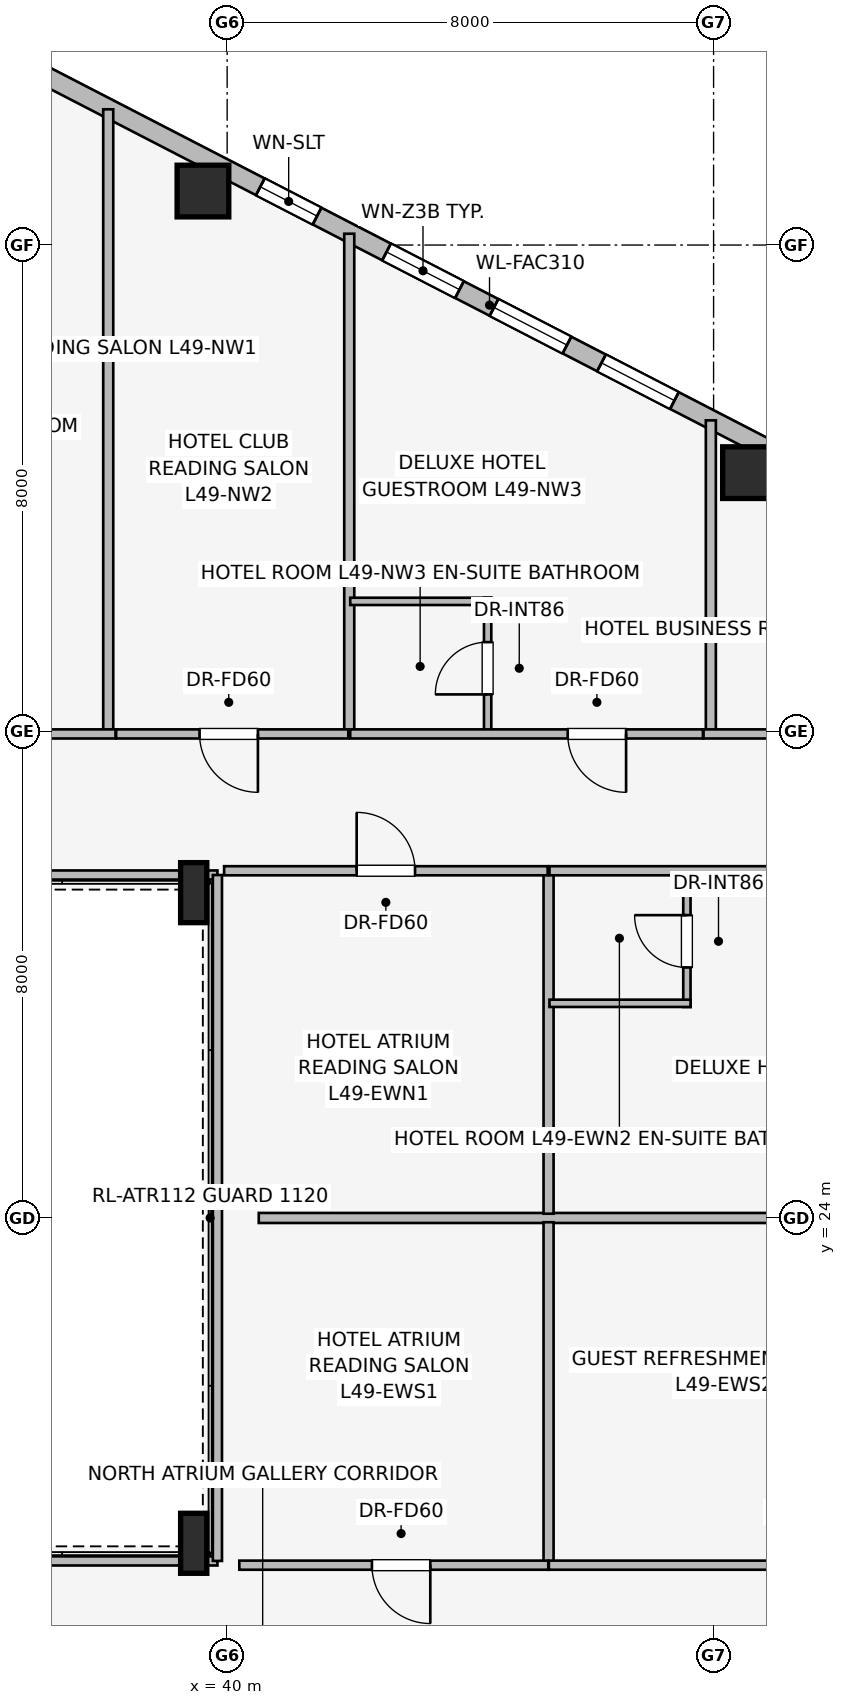
"""IFC4 building model, lengths in metres.
Left out: names, types, materials, properties, quantities, classifications, styles, units other than length and angle.
Written with IfcOpenShell. Run it as: python <this file> out.ifc"""

import sys

from ifc_helpers import new_model, si_unit, direction, frame, frame_2d, origin, origin_2d, place, context, subcontext, project, spatial, rectangle, i_section, extrude, element, fill, save


model = new_model("IFC4")
c1 = context("Model", 3, precision=1e-05, world=origin(), true_north=direction((0.0, 1.0)))
c2 = subcontext(c1, "Body", "Model", "MODEL_VIEW")
j1 = project(units=[si_unit("LENGTHUNIT", "METRE"), si_unit("PLANEANGLEUNIT", "RADIAN")], contexts=[c1])
p1 = place(None, origin())
s1 = spatial("IfcSite", under=j1, at=p1, CompositionType="ELEMENT")
p2 = place(p1, origin())
s2 = spatial("IfcBuilding", under=s1, at=p2, CompositionType="ELEMENT")
p3 = place(p2, frame((0.0, 0.0, 180.9)))
s3 = spatial("IfcBuildingStorey", under=s2, at=p3, CompositionType="ELEMENT", Elevation=180.9)
for number, where, z_axis, x_axis in (
    (1, (48.574, 36.257, 0.0), (0.0, 0.0, 1.0), (1.0, 0.0, 0.0)),
    (2, (39.602, 40.888, 0.0), (0.0, 0.0, 1.0), (1.0, 0.0, 0.0)),
):
    element("IfcColumn", number, at=place(p3, frame(where, z_axis=z_axis, x_axis=x_axis)), inside=s3, PredefinedType="COLUMN", context=c2, shape_type="SweptSolid", body=[
        extrude(rectangle(XDim=0.85, YDim=0.85, at=origin_2d()), origin(), (0.0, 0.0, 1.0), 3.45),
    ])
for number, where, z_axis, x_axis in (
    (3, (39.45, 18.65, 0.0), (0.0, 0.0, 1.0), (1.0, 0.0, 0.0)),
    (4, (39.45, 29.35, 0.0), (0.0, 0.0, 1.0), (1.0, 0.0, 0.0)),
):
    element("IfcColumn", number, at=place(p3, frame(where, z_axis=z_axis, x_axis=x_axis)), inside=s3, PredefinedType="COLUMN", context=c2, shape_type="SweptSolid", body=[
        extrude(i_section(OverallWidth=0.431, OverallDepth=0.987, WebThickness=0.034, FlangeThickness=0.062, at=origin_2d()), origin(), (0.0, 0.0, 1.0), 3.45),
    ])
p4 = place(p3, frame((36.838, 42.871, 0.0), z_axis=(0.0, 0.0, 1.0), x_axis=(0.888626188278, -0.458632202867, 0.0)))
e5 = element("IfcWall", 5, at=p4, inside=s3, PredefinedType="STANDARD", context=c2, shape_type="SweptSolid", body=[
    extrude(rectangle(XDim=16.828, YDim=0.31, at=frame_2d((8.414, 0.0))), origin(), (0.0, 0.0, 1.0), 3.19),
])
p5 = place(p4, frame((4.172, 0.0, 0.75)))
e6 = element("IfcOpeningElement", 6, at=p5, cuts=e5, PredefinedType="OPENING", context=c2, shape_type="SweptSolid", body=[
    extrude(rectangle(XDim=1.05, YDim=1.4, at=frame_2d((0.525, 0.7))), frame((0.0, 0.165, 0.0), z_axis=(0.0, -1.0, 0.0), x_axis=(1.0, 0.0, 0.0)), (0.0, 0.0, 1.0), 0.33),
])
p6 = place(p4, frame((6.508, 0.0, 0.75)))
e7 = element("IfcOpeningElement", 7, at=p6, cuts=e5, PredefinedType="OPENING", context=c2, shape_type="SweptSolid", body=[
    extrude(rectangle(XDim=1.35, YDim=1.45, at=frame_2d((0.675, 0.725))), frame((0.0, 0.165, 0.0), z_axis=(0.0, -1.0, 0.0), x_axis=(1.0, 0.0, 0.0)), (0.0, 0.0, 1.0), 0.33),
])
p7 = place(p4, frame((8.497, 0.0, 0.75)))
e8 = element("IfcOpeningElement", 8, at=p7, cuts=e5, PredefinedType="OPENING", context=c2, shape_type="SweptSolid", body=[
    extrude(rectangle(XDim=1.35, YDim=1.45, at=frame_2d((0.675, 0.725))), frame((0.0, 0.165, 0.0), z_axis=(0.0, -1.0, 0.0), x_axis=(1.0, 0.0, 0.0)), (0.0, 0.0, 1.0), 0.33),
])
p8 = place(p4, frame((10.486, 0.0, 0.75)))
e9 = element("IfcOpeningElement", 9, at=p8, cuts=e5, PredefinedType="OPENING", context=c2, shape_type="SweptSolid", body=[
    extrude(rectangle(XDim=1.35, YDim=1.45, at=frame_2d((0.675, 0.725))), frame((0.0, 0.165, 0.0), z_axis=(0.0, -1.0, 0.0), x_axis=(1.0, 0.0, 0.0)), (0.0, 0.0, 1.0), 0.33),
])
p9 = place(p4, frame((14.153, 0.0, 0.75)))
e10 = element("IfcOpeningElement", 10, at=p9, cuts=e5, PredefinedType="OPENING", context=c2, shape_type="SweptSolid", body=[
    extrude(rectangle(XDim=2.0, YDim=1.5, at=frame_2d((1.0, 0.75))), frame((0.0, 0.165, 0.0), z_axis=(0.0, -1.0, 0.0), x_axis=(1.0, 0.0, 0.0)), (0.0, 0.0, 1.0), 0.33),
])
p10 = place(p3, frame((27.675, 18.36, 0.0), z_axis=(0.0, 0.0, 1.0), x_axis=(1.0, 0.0, 0.0)))
e11 = element("IfcWall", 11, at=p10, inside=s3, PredefinedType="PARTITIONING", context=c2, shape_type="SweptSolid", body=[
    extrude(rectangle(XDim=12.165, YDim=0.15, at=frame_2d((6.083, 0.0))), origin(), (0.0, 0.0, 1.0), 2.331),
])
p11 = place(p3, frame((39.84, 29.64, 0.0), z_axis=(0.0, 0.0, 1.0), x_axis=(-1.0, 0.0, 0.0)))
e12 = element("IfcWall", 12, at=p11, inside=s3, PredefinedType="PARTITIONING", context=c2, shape_type="SweptSolid", body=[
    extrude(rectangle(XDim=12.2, YDim=0.15, at=frame_2d((6.1, 0.0))), origin(), (0.0, 0.0, 1.0), 2.331),
])
p12 = place(p3, frame((39.84, 18.36, 0.0), z_axis=(0.0, 0.0, 1.0), x_axis=(0.0, 1.0, 0.0)))
e13 = element("IfcWall", 13, at=p12, inside=s3, PredefinedType="PARTITIONING", context=c2, shape_type="SweptSolid", body=[
    extrude(rectangle(XDim=11.28, YDim=0.15, at=frame_2d((5.64, 0.0))), origin(), (0.0, 0.0, 1.0), 3.19),
])
p13 = place(p3, frame((38.044, 31.97, 0.0), z_axis=(0.0, 0.0, 1.0), x_axis=(0.0, 1.0, 0.0)))
e14 = element("IfcWall", 14, at=p13, inside=s3, PredefinedType="PARTITIONING", context=c2, shape_type="SweptSolid", body=[
    extrude(rectangle(XDim=10.262, YDim=0.165, at=frame_2d((5.131, 0.0))), origin(), (0.0, 0.0, 1.0), 3.19),
])
p14 = place(p3, frame((42.008, 31.97, 0.0), z_axis=(0.0, 0.0, 1.0), x_axis=(0.0, 1.0, 0.0)))
e15 = element("IfcWall", 15, at=p14, inside=s3, PredefinedType="PARTITIONING", context=c2, shape_type="SweptSolid", body=[
    extrude(rectangle(XDim=8.216, YDim=0.165, at=frame_2d((4.108, 0.0))), origin(), (0.0, 0.0, 1.0), 3.19),
])
p15 = place(p3, frame((47.955, 31.97, 0.0), z_axis=(0.0, 0.0, 1.0), x_axis=(0.0, 1.0, 0.0)))
e16 = element("IfcWall", 16, at=p15, inside=s3, PredefinedType="PARTITIONING", context=c2, shape_type="SweptSolid", body=[
    extrude(rectangle(XDim=5.147, YDim=0.165, at=frame_2d((2.573, 0.0))), origin(), (0.0, 0.0, 1.0), 3.19),
])
p16 = place(p3, frame((38.164, 31.96, 0.0), z_axis=(0.0, 0.0, 1.0), x_axis=(-1.0, 0.0, 0.0)))
e17 = element("IfcWall", 17, at=p16, inside=s3, PredefinedType="PARTITIONING", context=c2, shape_type="SweptSolid", body=[
    extrude(rectangle(XDim=3.874, YDim=0.15, at=frame_2d((1.937, 0.0))), origin(), (0.0, 0.0, 1.0), 3.19),
])
p17 = place(p16, frame((1.4, 0.0, 0.0)))
e18 = element("IfcOpeningElement", 18, at=p17, cuts=e17, PredefinedType="OPENING", context=c2, shape_type="SweptSolid", body=[
    extrude(rectangle(XDim=0.96, YDim=2.0, at=frame_2d((0.48, 1.0))), frame((0.0, 0.085, 0.0), z_axis=(0.0, -1.0, 0.0), x_axis=(1.0, 0.0, 0.0)), (0.0, 0.0, 1.0), 0.17),
])
p18 = place(p3, frame((41.992, 31.96, 0.0), z_axis=(0.0, 0.0, 1.0), x_axis=(-1.0, 0.0, 0.0)))
e19 = element("IfcWall", 19, at=p18, inside=s3, PredefinedType="PARTITIONING", context=c2, shape_type="SweptSolid", body=[
    extrude(rectangle(XDim=3.818, YDim=0.15, at=frame_2d((1.909, 0.0))), origin(), (0.0, 0.0, 1.0), 3.19),
])
p19 = place(p18, frame((1.486, 0.0, 0.0)))
e20 = element("IfcOpeningElement", 20, at=p19, cuts=e19, PredefinedType="OPENING", context=c2, shape_type="SweptSolid", body=[
    extrude(rectangle(XDim=0.96, YDim=2.0, at=frame_2d((0.48, 1.0))), frame((0.0, 0.085, 0.0), z_axis=(0.0, -1.0, 0.0), x_axis=(1.0, 0.0, 0.0)), (0.0, 0.0, 1.0), 0.17),
])
p20 = place(p3, frame((44.284, 31.96, 0.0), z_axis=(0.0, 0.0, 1.0), x_axis=(0.0, 1.0, 0.0)))
e21 = element("IfcWall", 21, at=p20, inside=s3, PredefinedType="PARTITIONING", context=c2, shape_type="SweptSolid", body=[
    extrude(rectangle(XDim=2.24, YDim=0.12, at=frame_2d((1.12, 0.0))), origin(), (0.0, 0.0, 1.0), 3.19),
])
p21 = place(p20, frame((0.65, 0.0, 0.0)))
e22 = element("IfcOpeningElement", 22, at=p21, cuts=e21, PredefinedType="OPENING", context=c2, shape_type="SweptSolid", body=[
    extrude(rectangle(XDim=0.86, YDim=2.0, at=frame_2d((0.43, 1.0))), frame((0.0, 0.07, 0.0), z_axis=(0.0, -1.0, 0.0), x_axis=(1.0, 0.0, 0.0)), (0.0, 0.0, 1.0), 0.14),
])
p22 = place(p3, frame((44.344, 34.14, 0.0), z_axis=(0.0, 0.0, 1.0), x_axis=(-1.0, 0.0, 0.0)))
e23 = element("IfcWall", 23, at=p22, inside=s3, PredefinedType="PARTITIONING", context=c2, shape_type="SweptSolid", body=[
    extrude(rectangle(XDim=2.32, YDim=0.12, at=frame_2d((1.16, 0.0))), origin(), (0.0, 0.0, 1.0), 3.19),
])
p23 = place(p3, frame((47.825, 31.96, 0.0), z_axis=(0.0, 0.0, 1.0), x_axis=(-1.0, 0.0, 0.0)))
e24 = element("IfcWall", 24, at=p23, inside=s3, PredefinedType="PARTITIONING", context=c2, shape_type="SweptSolid", body=[
    extrude(rectangle(XDim=5.801, YDim=0.15, at=frame_2d((2.9, 0.0))), origin(), (0.0, 0.0, 1.0), 3.19),
])
p24 = place(p23, frame((1.264, 0.0, 0.0)))
e25 = element("IfcOpeningElement", 25, at=p24, cuts=e24, PredefinedType="OPENING", context=c2, shape_type="SweptSolid", body=[
    extrude(rectangle(XDim=0.96, YDim=2.0, at=frame_2d((0.48, 1.0))), frame((0.0, 0.085, 0.0), z_axis=(0.0, -1.0, 0.0), x_axis=(1.0, 0.0, 0.0)), (0.0, 0.0, 1.0), 0.17),
])
p25 = place(p3, frame((53.97, 31.96, 0.0), z_axis=(0.0, 0.0, 1.0), x_axis=(-1.0, 0.0, 0.0)))
e26 = element("IfcWall", 26, at=p25, inside=s3, PredefinedType="PARTITIONING", context=c2, shape_type="SweptSolid", body=[
    extrude(rectangle(XDim=6.135, YDim=0.15, at=frame_2d((3.067, 0.0))), origin(), (0.0, 0.0, 1.0), 3.19),
])
p26 = place(p25, frame((2.644, 0.0, 0.0)))
e27 = element("IfcOpeningElement", 27, at=p26, cuts=e26, PredefinedType="OPENING", context=c2, shape_type="SweptSolid", body=[
    extrude(rectangle(XDim=0.96, YDim=2.0, at=frame_2d((0.48, 1.0))), frame((0.0, 0.085, 0.0), z_axis=(0.0, -1.0, 0.0), x_axis=(1.0, 0.0, 0.0)), (0.0, 0.0, 1.0), 0.17),
])
p27 = place(p3, frame((40.52, 24.0, 0.0), z_axis=(0.0, 0.0, 1.0), x_axis=(1.0, 0.0, 0.0)))
e28 = element("IfcWall", 28, at=p27, inside=s3, PredefinedType="PARTITIONING", context=c2, shape_type="SweptSolid", body=[
    extrude(rectangle(XDim=13.482, YDim=0.165, at=frame_2d((6.741, 0.0))), origin(), (0.0, 0.0, 1.0), 3.19),
])
p28 = place(p3, frame((45.286, 24.07, 0.0), z_axis=(0.0, 0.0, 1.0), x_axis=(0.0, 1.0, 0.0)))
e29 = element("IfcWall", 29, at=p28, inside=s3, PredefinedType="PARTITIONING", context=c2, shape_type="SweptSolid", body=[
    extrude(rectangle(XDim=5.64, YDim=0.165, at=frame_2d((2.82, 0.0))), origin(), (0.0, 0.0, 1.0), 3.19),
])
p29 = place(p3, frame((39.95, 29.71, 0.0), z_axis=(0.0, 0.0, 1.0), x_axis=(1.0, 0.0, 0.0)))
e30 = element("IfcWall", 30, at=p29, inside=s3, PredefinedType="PARTITIONING", context=c2, shape_type="SweptSolid", body=[
    extrude(rectangle(XDim=5.321, YDim=0.15, at=frame_2d((2.661, 0.0))), origin(), (0.0, 0.0, 1.0), 3.19),
])
p30 = place(p29, frame((2.18, 0.0, 0.0)))
e31 = element("IfcOpeningElement", 31, at=p30, cuts=e30, PredefinedType="OPENING", context=c2, shape_type="SweptSolid", body=[
    extrude(rectangle(XDim=0.96, YDim=2.0, at=frame_2d((0.48, 1.0))), frame((0.0, 0.085, 0.0), z_axis=(0.0, -1.0, 0.0), x_axis=(1.0, 0.0, 0.0)), (0.0, 0.0, 1.0), 0.17),
])
p31 = place(p3, frame((47.561, 27.47, 0.0), z_axis=(0.0, 0.0, 1.0), x_axis=(0.0, 1.0, 0.0)))
e32 = element("IfcWall", 32, at=p31, inside=s3, PredefinedType="PARTITIONING", context=c2, shape_type="SweptSolid", body=[
    extrude(rectangle(XDim=2.24, YDim=0.12, at=frame_2d((1.12, 0.0))), origin(), (0.0, 0.0, 1.0), 3.19),
])
p32 = place(p31, frame((0.65, 0.0, 0.0)))
e33 = element("IfcOpeningElement", 33, at=p32, cuts=e32, PredefinedType="OPENING", context=c2, shape_type="SweptSolid", body=[
    extrude(rectangle(XDim=0.86, YDim=2.0, at=frame_2d((0.43, 1.0))), frame((0.0, 0.07, 0.0), z_axis=(0.0, -1.0, 0.0), x_axis=(1.0, 0.0, 0.0)), (0.0, 0.0, 1.0), 0.14),
])
p33 = place(p3, frame((45.301, 27.53, 0.0), z_axis=(0.0, 0.0, 1.0), x_axis=(1.0, 0.0, 0.0)))
e34 = element("IfcWall", 34, at=p33, inside=s3, PredefinedType="PARTITIONING", context=c2, shape_type="SweptSolid", body=[
    extrude(rectangle(XDim=2.32, YDim=0.12, at=frame_2d((1.16, 0.0))), origin(), (0.0, 0.0, 1.0), 3.19),
])
p34 = place(p3, frame((45.301, 29.71, 0.0), z_axis=(0.0, 0.0, 1.0), x_axis=(1.0, 0.0, 0.0)))
e35 = element("IfcWall", 35, at=p34, inside=s3, PredefinedType="PARTITIONING", context=c2, shape_type="SweptSolid", body=[
    extrude(rectangle(XDim=8.861, YDim=0.15, at=frame_2d((4.431, 0.0))), origin(), (0.0, 0.0, 1.0), 3.19),
])
p35 = place(p34, frame((5.125, 0.0, 0.0)))
e36 = element("IfcOpeningElement", 36, at=p35, cuts=e35, PredefinedType="OPENING", context=c2, shape_type="SweptSolid", body=[
    extrude(rectangle(XDim=0.96, YDim=2.0, at=frame_2d((0.48, 1.0))), frame((0.0, 0.085, 0.0), z_axis=(0.0, -1.0, 0.0), x_axis=(1.0, 0.0, 0.0)), (0.0, 0.0, 1.0), 0.17),
])
p36 = place(p3, frame((45.286, 18.29, 0.0), z_axis=(0.0, 0.0, 1.0), x_axis=(0.0, 1.0, 0.0)))
e37 = element("IfcWall", 37, at=p36, inside=s3, PredefinedType="PARTITIONING", context=c2, shape_type="SweptSolid", body=[
    extrude(rectangle(XDim=5.64, YDim=0.165, at=frame_2d((2.82, 0.0))), origin(), (0.0, 0.0, 1.0), 3.19),
])
p37 = place(p3, frame((45.281, 18.29, 0.0), z_axis=(0.0, 0.0, 1.0), x_axis=(-1.0, 0.0, 0.0)))
e38 = element("IfcWall", 38, at=p37, inside=s3, PredefinedType="PARTITIONING", context=c2, shape_type="SweptSolid", body=[
    extrude(rectangle(XDim=5.081, YDim=0.15, at=frame_2d((2.541, 0.0))), origin(), (0.0, 0.0, 1.0), 3.19),
])
p38 = place(p37, frame((1.94, 0.0, 0.0)))
e39 = element("IfcOpeningElement", 39, at=p38, cuts=e38, PredefinedType="OPENING", context=c2, shape_type="SweptSolid", body=[
    extrude(rectangle(XDim=0.96, YDim=2.0, at=frame_2d((0.48, 1.0))), frame((0.0, 0.085, 0.0), z_axis=(0.0, -1.0, 0.0), x_axis=(1.0, 0.0, 0.0)), (0.0, 0.0, 1.0), 0.17),
])
p39 = place(p3, frame((54.062, 18.29, 0.0), z_axis=(0.0, 0.0, 1.0), x_axis=(-1.0, 0.0, 0.0)))
e40 = element("IfcWall", 40, at=p39, inside=s3, PredefinedType="PARTITIONING", context=c2, shape_type="SweptSolid", body=[
    extrude(rectangle(XDim=8.771, YDim=0.15, at=frame_2d((4.385, 0.0))), origin(), (0.0, 0.0, 1.0), 3.19),
])
p40 = place(p39, frame((4.025, 0.0, 0.0)))
e41 = element("IfcOpeningElement", 41, at=p40, cuts=e40, PredefinedType="OPENING", context=c2, shape_type="SweptSolid", body=[
    extrude(rectangle(XDim=0.96, YDim=2.0, at=frame_2d((0.48, 1.0))), frame((0.0, 0.085, 0.0), z_axis=(0.0, -1.0, 0.0), x_axis=(1.0, 0.0, 0.0)), (0.0, 0.0, 1.0), 0.17),
])
p41 = place(p5, origin())
e42 = element("IfcWindow", 42, at=p41, inside=s3, PartitioningType="SINGLE_PANEL", PredefinedType="WINDOW", context=c2, shape_type="SweptSolid", body=[
    extrude(rectangle(XDim=1.05, YDim=1.4, at=frame_2d((0.525, 0.7))), frame((0.0, 0.03, 0.0), z_axis=(0.0, -1.0, 0.0), x_axis=(1.0, 0.0, 0.0)), (0.0, 0.0, 1.0), 0.06),
])
fill(e6, e42)
p42 = place(p6, origin())
e43 = element("IfcWindow", 43, at=p42, inside=s3, PartitioningType="SINGLE_PANEL", PredefinedType="WINDOW", context=c2, shape_type="SweptSolid", body=[
    extrude(rectangle(XDim=1.35, YDim=1.45, at=frame_2d((0.675, 0.725))), frame((0.0, 0.03, 0.0), z_axis=(0.0, -1.0, 0.0), x_axis=(1.0, 0.0, 0.0)), (0.0, 0.0, 1.0), 0.06),
])
fill(e7, e43)
p43 = place(p7, origin())
e44 = element("IfcWindow", 44, at=p43, inside=s3, PartitioningType="SINGLE_PANEL", PredefinedType="WINDOW", context=c2, shape_type="SweptSolid", body=[
    extrude(rectangle(XDim=1.35, YDim=1.45, at=frame_2d((0.675, 0.725))), frame((0.0, 0.03, 0.0), z_axis=(0.0, -1.0, 0.0), x_axis=(1.0, 0.0, 0.0)), (0.0, 0.0, 1.0), 0.06),
])
fill(e8, e44)
p44 = place(p8, origin())
e45 = element("IfcWindow", 45, at=p44, inside=s3, PartitioningType="SINGLE_PANEL", PredefinedType="WINDOW", context=c2, shape_type="SweptSolid", body=[
    extrude(rectangle(XDim=1.35, YDim=1.45, at=frame_2d((0.675, 0.725))), frame((0.0, 0.03, 0.0), z_axis=(0.0, -1.0, 0.0), x_axis=(1.0, 0.0, 0.0)), (0.0, 0.0, 1.0), 0.06),
])
fill(e9, e45)
p45 = place(p19, origin())
e46 = element("IfcDoor", 46, at=p45, inside=s3, OperationType="SINGLE_SWING_LEFT", PredefinedType="DOOR", context=c2, shape_type="SweptSolid", body=[
    extrude(rectangle(XDim=0.96, YDim=2.0, at=frame_2d((0.48, 1.0))), frame((0.0, 0.025, 0.0), z_axis=(0.0, -1.0, 0.0), x_axis=(1.0, 0.0, 0.0)), (0.0, 0.0, 1.0), 0.05),
])
fill(e20, e46)
p46 = place(p21, origin())
e47 = element("IfcDoor", 47, at=p46, inside=s3, OperationType="SINGLE_SWING_LEFT", PredefinedType="DOOR", context=c2, shape_type="SweptSolid", body=[
    extrude(rectangle(XDim=0.86, YDim=2.0, at=frame_2d((0.43, 1.0))), frame((0.0, 0.025, 0.0), z_axis=(0.0, -1.0, 0.0), x_axis=(1.0, 0.0, 0.0)), (0.0, 0.0, 1.0), 0.05),
])
fill(e22, e47)
p47 = place(p24, origin())
e48 = element("IfcDoor", 48, at=p47, inside=s3, OperationType="SINGLE_SWING_LEFT", PredefinedType="DOOR", context=c2, shape_type="SweptSolid", body=[
    extrude(rectangle(XDim=0.96, YDim=2.0, at=frame_2d((0.48, 1.0))), frame((0.0, 0.025, 0.0), z_axis=(0.0, -1.0, 0.0), x_axis=(1.0, 0.0, 0.0)), (0.0, 0.0, 1.0), 0.05),
])
fill(e25, e48)
p48 = place(p30, origin())
e49 = element("IfcDoor", 49, at=p48, inside=s3, OperationType="SINGLE_SWING_LEFT", PredefinedType="DOOR", context=c2, shape_type="SweptSolid", body=[
    extrude(rectangle(XDim=0.96, YDim=2.0, at=frame_2d((0.48, 1.0))), frame((0.0, 0.025, 0.0), z_axis=(0.0, -1.0, 0.0), x_axis=(1.0, 0.0, 0.0)), (0.0, 0.0, 1.0), 0.05),
])
fill(e31, e49)
p49 = place(p32, origin())
e50 = element("IfcDoor", 50, at=p49, inside=s3, OperationType="SINGLE_SWING_RIGHT", PredefinedType="DOOR", context=c2, shape_type="SweptSolid", body=[
    extrude(rectangle(XDim=0.86, YDim=2.0, at=frame_2d((0.43, 1.0))), frame((0.0, 0.025, 0.0), z_axis=(0.0, -1.0, 0.0), x_axis=(1.0, 0.0, 0.0)), (0.0, 0.0, 1.0), 0.05),
])
fill(e33, e50)
p50 = place(p38, origin())
e51 = element("IfcDoor", 51, at=p50, inside=s3, OperationType="SINGLE_SWING_LEFT", PredefinedType="DOOR", context=c2, shape_type="SweptSolid", body=[
    extrude(rectangle(XDim=0.96, YDim=2.0, at=frame_2d((0.48, 1.0))), frame((0.0, 0.025, 0.0), z_axis=(0.0, -1.0, 0.0), x_axis=(1.0, 0.0, 0.0)), (0.0, 0.0, 1.0), 0.05),
])
fill(e39, e51)
save(model, sys.argv[1])
